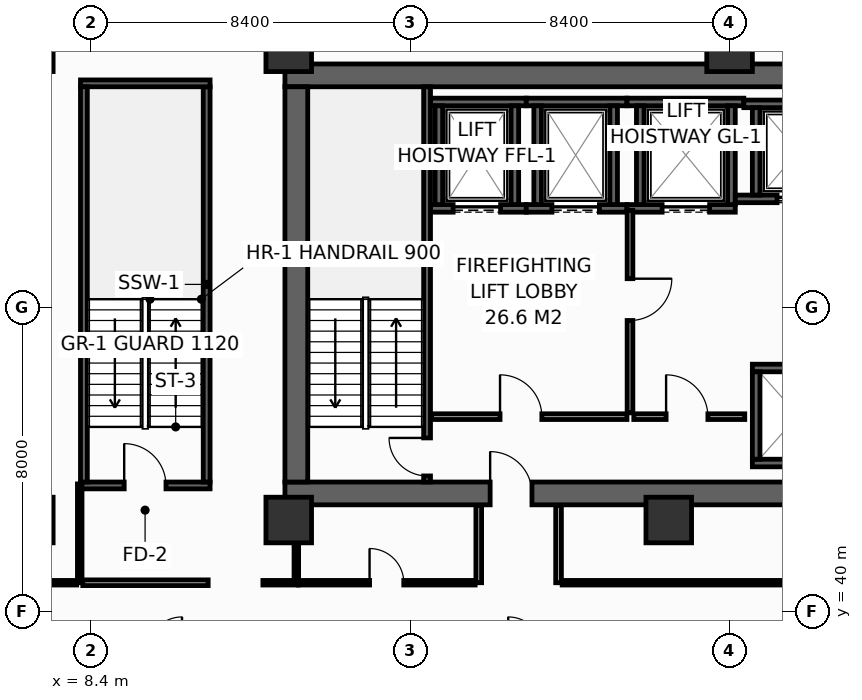
"""IFC4 building model, lengths in metres.
Left out: names, types, materials, properties, quantities, classifications, styles, units other than length and angle.
Written with IfcOpenShell. Run it as: python <this file> out.ifc"""

import sys

from ifc_helpers import new_model, si_unit, direction, frame, frame_2d, origin, origin_2d, place, context, subcontext, project, spatial, rectangle, hollow_rectangle, extrude, element, fill, save


model = new_model("IFC4")
c1 = context("Model", 3, precision=1e-05, world=origin(), true_north=direction((0.0, 1.0)))
c2 = subcontext(c1, "Body", "Model", "MODEL_VIEW")
j1 = project(units=[si_unit("LENGTHUNIT", "METRE"), si_unit("PLANEANGLEUNIT", "RADIAN")], contexts=[c1])
p1 = place(None, origin())
s1 = spatial("IfcSite", under=j1, at=p1, CompositionType="ELEMENT")
p2 = place(p1, origin())
s2 = spatial("IfcBuilding", under=s1, at=p2, CompositionType="ELEMENT")
p3 = place(p2, frame((0.0, 0.0, 38.4)))
s3 = spatial("IfcBuildingStorey", under=s2, at=p3, CompositionType="ELEMENT", Elevation=38.4)
p4 = place(p3, frame((13.5, 43.1, 0.0), z_axis=(0.0, 0.0, 1.0), x_axis=(1.0, 0.0, 0.0)))
e1 = element("IfcWall", 1, at=p4, inside=s3, PredefinedType="SHEAR", context=c2, shape_type="SweptSolid", body=[
    extrude(rectangle(XDim=32.9, YDim=0.6, at=frame_2d((16.45, 0.0))), origin(), (0.0, 0.0, 1.0), 4.15),
])
p5 = place(p4, frame((5.4, 0.0, 0.0)))
e2 = element("IfcOpeningElement", 2, at=p5, cuts=e1, PredefinedType="OPENING", context=c2, shape_type="SweptSolid", body=[
    extrude(rectangle(XDim=1.1, YDim=2.15, at=frame_2d((0.55, 1.075))), frame((0.0, 0.31, 0.0), z_axis=(0.0, -1.0, 0.0), x_axis=(1.0, 0.0, 0.0)), (0.0, 0.0, 1.0), 0.62),
])
p6 = place(p4, frame((25.6, 0.0, 0.0)))
e3 = element("IfcOpeningElement", 3, at=p6, cuts=e1, PredefinedType="OPENING", context=c2, shape_type="SweptSolid", body=[
    extrude(rectangle(XDim=1.1, YDim=2.15, at=frame_2d((0.55, 1.075))), frame((0.0, 0.31, 0.0), z_axis=(0.0, -1.0, 0.0), x_axis=(1.0, 0.0, 0.0)), (0.0, 0.0, 1.0), 0.62),
])
p7 = place(p3, frame((13.5, 54.1, 0.0), z_axis=(0.0, 0.0, 1.0), x_axis=(1.0, 0.0, 0.0)))
e4 = element("IfcWall", 4, at=p7, inside=s3, PredefinedType="SHEAR", context=c2, shape_type="SweptSolid", body=[
    extrude(rectangle(XDim=32.9, YDim=0.6, at=frame_2d((16.45, 0.0))), origin(), (0.0, 0.0, 1.0), 4.15),
])
p8 = place(p3, frame((13.8, 43.4, 0.0), z_axis=(0.0, 0.0, 1.0), x_axis=(0.0, 1.0, 0.0)))
e5 = element("IfcWall", 5, at=p8, inside=s3, PredefinedType="SHEAR", context=c2, shape_type="SweptSolid", body=[
    extrude(rectangle(XDim=10.4, YDim=0.6, at=frame_2d((5.2, 0.0))), origin(), (0.0, 0.0, 1.0), 4.15),
])
for number, where, z_axis, x_axis in (
    (6, (6.8, 54.8, 0.0), (0.0, 0.0, 1.0), (1.0, 0.0, 0.0)),
    (7, (13.6, 54.8, 0.0), (0.0, 0.0, 1.0), (1.0, 0.0, 0.0)),
    (8, (25.2, 54.8, 0.0), (0.0, 0.0, 1.0), (1.0, 0.0, 0.0)),
    (9, (6.8, 42.4, 0.0), (0.0, 0.0, 1.0), (1.0, 0.0, 0.0)),
    (10, (13.6, 42.4, 0.0), (0.0, 0.0, 1.0), (1.0, 0.0, 0.0)),
    (11, (23.6, 42.4, 0.0), (0.0, 0.0, 1.0), (1.0, 0.0, 0.0)),
):
    element("IfcColumn", number, at=place(p3, frame(where, z_axis=z_axis, x_axis=x_axis)), inside=s3, PredefinedType="COLUMN", context=c2, shape_type="SweptSolid", body=[
        extrude(hollow_rectangle(XDim=1.2, YDim=1.2, WallThickness=0.055, at=origin_2d()), origin(), (0.0, 0.0, 1.0), 4.4),
    ])
p9 = place(p3, frame((17.33, 50.6, 0.0), z_axis=(0.0, 0.0, 1.0), x_axis=(1.0, 0.0, 0.0)))
e12 = element("IfcWall", 12, at=p9, inside=s3, PredefinedType="SHEAR", context=c2, shape_type="SweptSolid", body=[
    extrude(rectangle(XDim=2.52, YDim=0.2, at=frame_2d((1.26, 0.0))), origin(), (0.0, 0.0, 1.0), 4.15),
])
p10 = place(p9, frame((0.595, 0.0, 0.0)))
e13 = element("IfcOpeningElement", 13, at=p10, cuts=e12, PredefinedType="OPENING", context=c2, shape_type="SweptSolid", body=[
    extrude(rectangle(XDim=1.25, YDim=2.3, at=frame_2d((0.625, 1.15))), frame((0.0, 0.11, 0.0), z_axis=(0.0, -1.0, 0.0), x_axis=(1.0, 0.0, 0.0)), (0.0, 0.0, 1.0), 0.22),
])
p11 = place(p3, frame((17.33, 53.4, 0.0), z_axis=(0.0, 0.0, 1.0), x_axis=(1.0, 0.0, 0.0)))
e14 = element("IfcWall", 14, at=p11, inside=s3, PredefinedType="SHEAR", context=c2, shape_type="SweptSolid", body=[
    extrude(rectangle(XDim=2.52, YDim=0.2, at=frame_2d((1.26, 0.0))), origin(), (0.0, 0.0, 1.0), 4.15),
])
for number, where, z_axis, x_axis in (
    (15, (17.55, 50.7, 0.0), (0.0, 0.0, 1.0), (0.0, 1.0, 0.0)),
    (16, (19.55, 50.7, 0.0), (0.0, 0.0, 1.0), (0.0, 1.0, 0.0)),
):
    element("IfcWall", number, at=place(p3, frame(where, z_axis=z_axis, x_axis=x_axis)), inside=s3, PredefinedType="SHEAR", context=c2, shape_type="SweptSolid", body=[
        extrude(rectangle(XDim=2.6, YDim=0.2, at=frame_2d((1.3, 0.0))), origin(), (0.0, 0.0, 1.0), 4.15),
    ])
p12 = place(p3, frame((19.85, 50.6, 0.0), z_axis=(0.0, 0.0, 1.0), x_axis=(1.0, 0.0, 0.0)))
e17 = element("IfcWall", 17, at=p12, inside=s3, PredefinedType="SHEAR", context=c2, shape_type="SweptSolid", body=[
    extrude(rectangle(XDim=2.65, YDim=0.2, at=frame_2d((1.325, 0.0))), origin(), (0.0, 0.0, 1.0), 4.15),
])
p13 = place(p12, frame((0.675, 0.0, 0.0)))
e18 = element("IfcOpeningElement", 18, at=p13, cuts=e17, PredefinedType="OPENING", context=c2, shape_type="SweptSolid", body=[
    extrude(rectangle(XDim=1.25, YDim=2.3, at=frame_2d((0.625, 1.15))), frame((0.0, 0.11, 0.0), z_axis=(0.0, -1.0, 0.0), x_axis=(1.0, 0.0, 0.0)), (0.0, 0.0, 1.0), 0.22),
])
p14 = place(p3, frame((19.85, 53.4, 0.0), z_axis=(0.0, 0.0, 1.0), x_axis=(1.0, 0.0, 0.0)))
e19 = element("IfcWall", 19, at=p14, inside=s3, PredefinedType="SHEAR", context=c2, shape_type="SweptSolid", body=[
    extrude(rectangle(XDim=2.65, YDim=0.2, at=frame_2d((1.325, 0.0))), origin(), (0.0, 0.0, 1.0), 4.15),
])
for number, where, z_axis, x_axis in (
    (20, (20.15, 50.7, 0.0), (0.0, 0.0, 1.0), (0.0, 1.0, 0.0)),
    (21, (22.15, 50.7, 0.0), (0.0, 0.0, 1.0), (0.0, 1.0, 0.0)),
):
    element("IfcWall", number, at=place(p3, frame(where, z_axis=z_axis, x_axis=x_axis)), inside=s3, PredefinedType="SHEAR", context=c2, shape_type="SweptSolid", body=[
        extrude(rectangle(XDim=2.6, YDim=0.2, at=frame_2d((1.3, 0.0))), origin(), (0.0, 0.0, 1.0), 4.15),
    ])
p15 = place(p3, frame((22.5, 50.6, 0.0), z_axis=(0.0, 0.0, 1.0), x_axis=(1.0, 0.0, 0.0)))
e22 = element("IfcWall", 22, at=p15, inside=s3, PredefinedType="SHEAR", context=c2, shape_type="SweptSolid", body=[
    extrude(rectangle(XDim=2.85, YDim=0.2, at=frame_2d((1.425, 0.0))), origin(), (0.0, 0.0, 1.0), 4.15),
])
p16 = place(p15, frame((0.925, 0.0, 0.0)))
e23 = element("IfcOpeningElement", 23, at=p16, cuts=e22, PredefinedType="OPENING", context=c2, shape_type="SweptSolid", body=[
    extrude(rectangle(XDim=1.25, YDim=2.3, at=frame_2d((0.625, 1.15))), frame((0.0, 0.11, 0.0), z_axis=(0.0, -1.0, 0.0), x_axis=(1.0, 0.0, 0.0)), (0.0, 0.0, 1.0), 0.22),
])
p17 = place(p3, frame((22.5, 53.4, 0.0), z_axis=(0.0, 0.0, 1.0), x_axis=(1.0, 0.0, 0.0)))
e24 = element("IfcWall", 24, at=p17, inside=s3, PredefinedType="SHEAR", context=c2, shape_type="SweptSolid", body=[
    extrude(rectangle(XDim=3.075, YDim=0.2, at=frame_2d((1.538, 0.0))), origin(), (0.0, 0.0, 1.0), 4.15),
])
for number, where, z_axis, x_axis in (
    (25, (22.85, 50.7, 0.0), (0.0, 0.0, 1.0), (0.0, 1.0, 0.0)),
    (26, (25.25, 50.7, 0.0), (0.0, 0.0, 1.0), (0.0, 1.0, 0.0)),
):
    element("IfcWall", number, at=place(p3, frame(where, z_axis=z_axis, x_axis=x_axis)), inside=s3, PredefinedType="SHEAR", context=c2, shape_type="SweptSolid", body=[
        extrude(rectangle(XDim=2.6, YDim=0.2, at=frame_2d((1.3, 0.0))), origin(), (0.0, 0.0, 1.0), 4.15),
    ])
p18 = place(p3, frame((25.35, 50.85, 0.0), z_axis=(0.0, 0.0, 1.0), x_axis=(1.0, 0.0, 0.0)))
e27 = element("IfcWall", 27, at=p18, inside=s3, PredefinedType="SHEAR", context=c2, shape_type="SweptSolid", body=[
    extrude(rectangle(XDim=3.025, YDim=0.2, at=frame_2d((1.512, 0.0))), origin(), (0.0, 0.0, 1.0), 4.15),
])
p19 = place(p18, frame((1.1, 0.0, 0.0)))
e28 = element("IfcOpeningElement", 28, at=p19, cuts=e27, PredefinedType="OPENING", context=c2, shape_type="SweptSolid", body=[
    extrude(rectangle(XDim=1.1, YDim=2.2, at=frame_2d((0.55, 1.1))), frame((0.0, 0.11, 0.0), z_axis=(0.0, -1.0, 0.0), x_axis=(1.0, 0.0, 0.0)), (0.0, 0.0, 1.0), 0.22),
])
p20 = place(p3, frame((25.575, 53.35, 0.0), z_axis=(0.0, 0.0, 1.0), x_axis=(1.0, 0.0, 0.0)))
e29 = element("IfcWall", 29, at=p20, inside=s3, PredefinedType="SHEAR", context=c2, shape_type="SweptSolid", body=[
    extrude(rectangle(XDim=2.8, YDim=0.2, at=frame_2d((1.4, 0.0))), origin(), (0.0, 0.0, 1.0), 4.15),
])
p21 = place(p3, frame((25.9, 50.95, 0.0), z_axis=(0.0, 0.0, 1.0), x_axis=(0.0, 1.0, 0.0)))
e30 = element("IfcWall", 30, at=p21, inside=s3, PredefinedType="SHEAR", context=c2, shape_type="SweptSolid", body=[
    extrude(rectangle(XDim=2.3, YDim=0.2, at=frame_2d((1.15, 0.0))), origin(), (0.0, 0.0, 1.0), 4.15),
])
for number, where, z_axis, x_axis in (
    (31, (25.8, 43.9, 0.0), (0.0, 0.0, 1.0), (1.0, 0.0, 0.0)),
    (32, (25.8, 46.4, 0.0), (0.0, 0.0, 1.0), (1.0, 0.0, 0.0)),
):
    element("IfcWall", number, at=place(p3, frame(where, z_axis=z_axis, x_axis=x_axis)), inside=s3, PredefinedType="SHEAR", context=c2, shape_type="SweptSolid", body=[
        extrude(rectangle(XDim=2.575, YDim=0.2, at=frame_2d((1.288, 0.0))), origin(), (0.0, 0.0, 1.0), 4.15),
    ])
p22 = place(p3, frame((25.9, 44.0, 0.0), z_axis=(0.0, 0.0, 1.0), x_axis=(0.0, 1.0, 0.0)))
e33 = element("IfcWall", 33, at=p22, inside=s3, PredefinedType="SHEAR", context=c2, shape_type="SweptSolid", body=[
    extrude(rectangle(XDim=2.3, YDim=0.2, at=frame_2d((1.15, 0.0))), origin(), (0.0, 0.0, 1.0), 4.15),
])
p23 = place(p3, frame((17.24, 43.4, 0.0), z_axis=(0.0, 0.0, 1.0), x_axis=(0.0, 1.0, 0.0)))
e34 = element("IfcWall", 34, at=p23, inside=s3, PredefinedType="SHEAR", context=c2, shape_type="SweptSolid", body=[
    extrude(rectangle(XDim=10.4, YDim=0.18, at=frame_2d((5.2, 0.0))), origin(), (0.0, 0.0, 1.0), 4.15),
])
p24 = place(p23, frame((0.16, 0.0, 0.0)))
e35 = element("IfcOpeningElement", 35, at=p24, cuts=e34, PredefinedType="OPENING", context=c2, shape_type="SweptSolid", body=[
    extrude(rectangle(XDim=1.0, YDim=2.15, at=frame_2d((0.5, 1.075))), frame((0.0, 0.1, 0.0), z_axis=(0.0, -1.0, 0.0), x_axis=(1.0, 0.0, 0.0)), (0.0, 0.0, 1.0), 0.2),
])
p25 = place(p3, frame((8.12, 43.31, 0.0), z_axis=(0.0, 0.0, 1.0), x_axis=(1.0, 0.0, 0.0)))
e36 = element("IfcWall", 36, at=p25, inside=s3, PredefinedType="SHEAR", context=c2, shape_type="SweptSolid", body=[
    extrude(rectangle(XDim=3.41, YDim=0.18, at=frame_2d((1.705, 0.0))), origin(), (0.0, 0.0, 1.0), 4.15),
])
p26 = place(p25, frame((1.15, 0.0, 0.0)))
e37 = element("IfcOpeningElement", 37, at=p26, cuts=e36, PredefinedType="OPENING", context=c2, shape_type="SweptSolid", body=[
    extrude(rectangle(XDim=1.1, YDim=2.15, at=frame_2d((0.55, 1.075))), frame((0.0, 0.1, 0.0), z_axis=(0.0, -1.0, 0.0), x_axis=(1.0, 0.0, 0.0)), (0.0, 0.0, 1.0), 0.2),
])
p27 = place(p3, frame((11.44, 43.4, 0.0), z_axis=(0.0, 0.0, 1.0), x_axis=(0.0, 1.0, 0.0)))
e38 = element("IfcWall", 38, at=p27, inside=s3, PredefinedType="SHEAR", context=c2, shape_type="SweptSolid", body=[
    extrude(rectangle(XDim=10.4, YDim=0.18, at=frame_2d((5.2, 0.0))), origin(), (0.0, 0.0, 1.0), 4.15),
])
p28 = place(p3, frame((11.53, 53.89, 0.0), z_axis=(0.0, 0.0, 1.0), x_axis=(-1.0, 0.0, 0.0)))
e39 = element("IfcWall", 39, at=p28, inside=s3, PredefinedType="SHEAR", context=c2, shape_type="SweptSolid", body=[
    extrude(rectangle(XDim=3.41, YDim=0.18, at=frame_2d((1.705, 0.0))), origin(), (0.0, 0.0, 1.0), 4.15),
])
p29 = place(p3, frame((8.21, 53.8, 0.0), z_axis=(0.0, 0.0, 1.0), x_axis=(0.0, -1.0, 0.0)))
e40 = element("IfcWall", 40, at=p29, inside=s3, PredefinedType="SHEAR", context=c2, shape_type="SweptSolid", body=[
    extrude(rectangle(XDim=10.4, YDim=0.18, at=frame_2d((5.2, 0.0))), origin(), (0.0, 0.0, 1.0), 4.15),
])
p30 = place(p3, frame((17.36, 45.12, 0.0), z_axis=(0.0, 0.0, 1.0), x_axis=(1.0, 0.0, 0.0)))
e41 = element("IfcWall", 41, at=p30, inside=s3, PredefinedType="PARTITIONING", context=c2, shape_type="SweptSolid", body=[
    extrude(rectangle(XDim=5.14, YDim=0.15, at=frame_2d((2.57, 0.0))), origin(), (0.0, 0.0, 1.0), 4.15),
])
p31 = place(p30, frame((1.8, 0.0, 0.0)))
e42 = element("IfcOpeningElement", 42, at=p31, cuts=e41, PredefinedType="OPENING", context=c2, shape_type="SweptSolid", body=[
    extrude(rectangle(XDim=1.1, YDim=2.15, at=frame_2d((0.55, 1.075))), frame((0.0, 0.085, 0.0), z_axis=(0.0, -1.0, 0.0), x_axis=(1.0, 0.0, 0.0)), (0.0, 0.0, 1.0), 0.17),
])
p32 = place(p3, frame((22.58, 50.55, 0.0), z_axis=(0.0, 0.0, 1.0), x_axis=(0.0, -1.0, 0.0)))
e43 = element("IfcWall", 43, at=p32, inside=s3, PredefinedType="PARTITIONING", context=c2, shape_type="SweptSolid", body=[
    extrude(rectangle(XDim=5.33, YDim=0.15, at=frame_2d((2.665, 0.0))), origin(), (0.0, 0.0, 1.0), 4.15),
])
p33 = place(p32, frame((1.8, 0.0, 0.0)))
e44 = element("IfcOpeningElement", 44, at=p33, cuts=e43, PredefinedType="OPENING", context=c2, shape_type="SweptSolid", body=[
    extrude(rectangle(XDim=1.1, YDim=2.15, at=frame_2d((0.55, 1.075))), frame((0.0, 0.085, 0.0), z_axis=(0.0, -1.0, 0.0), x_axis=(1.0, 0.0, 0.0)), (0.0, 0.0, 1.0), 0.17),
])
p34 = place(p3, frame((22.68, 45.12, 0.0), z_axis=(0.0, 0.0, 1.0), x_axis=(1.0, 0.0, 0.0)))
e45 = element("IfcWall", 45, at=p34, inside=s3, PredefinedType="PARTITIONING", context=c2, shape_type="SweptSolid", body=[
    extrude(rectangle(XDim=2.92, YDim=0.15, at=frame_2d((1.46, 0.0))), origin(), (0.0, 0.0, 1.0), 4.15),
])
p35 = place(p34, frame((0.85, 0.0, 0.0)))
e46 = element("IfcOpeningElement", 46, at=p35, cuts=e45, PredefinedType="OPENING", context=c2, shape_type="SweptSolid", body=[
    extrude(rectangle(XDim=1.1, YDim=2.15, at=frame_2d((0.55, 1.075))), frame((0.0, 0.085, 0.0), z_axis=(0.0, -1.0, 0.0), x_axis=(1.0, 0.0, 0.0)), (0.0, 0.0, 1.0), 0.17),
])
p36 = place(p3, frame((12.92, 40.75, 0.0), z_axis=(0.0, 0.0, 1.0), x_axis=(1.0, 0.0, 0.0)))
e47 = element("IfcWall", 47, at=p36, inside=s3, PredefinedType="PARTITIONING", context=c2, shape_type="SweptSolid", body=[
    extrude(rectangle(XDim=0.93, YDim=0.12, at=frame_2d((0.465, 0.0))), origin(), (0.0, 0.0, 1.0), 4.15),
])
p37 = place(p3, frame((13.8, 40.83, 0.0), z_axis=(0.0, 0.0, 1.0), x_axis=(0.0, 1.0, 0.0)))
e48 = element("IfcWall", 48, at=p37, inside=s3, PredefinedType="PARTITIONING", context=c2, shape_type="SweptSolid", body=[
    extrude(rectangle(XDim=1.95, YDim=0.12, at=frame_2d((0.975, 0.0))), origin(), (0.0, 0.0, 1.0), 4.15),
])
p38 = place(p3, frame((8.1, 40.75, 0.0), z_axis=(0.0, 0.0, 1.0), x_axis=(0.0, 1.0, 0.0)))
e49 = element("IfcWall", 49, at=p38, inside=s3, PredefinedType="PARTITIONING", context=c2, shape_type="SweptSolid", body=[
    extrude(rectangle(XDim=2.6, YDim=0.12, at=frame_2d((1.3, 0.0))), origin(), (0.0, 0.0, 1.0), 3.335),
])
p39 = place(p3, frame((8.18, 40.75, 0.0), z_axis=(0.0, 0.0, 1.0), x_axis=(1.0, 0.0, 0.0)))
e50 = element("IfcWall", 50, at=p39, inside=s3, PredefinedType="PARTITIONING", context=c2, shape_type="SweptSolid", body=[
    extrude(rectangle(XDim=3.3, YDim=0.15, at=frame_2d((1.65, 0.0))), origin(), (0.0, 0.0, 1.0), 4.15),
])
p40 = place(p3, frame((5.979, 40.75, 0.0), z_axis=(0.0, 0.0, 1.0), x_axis=(1.0, 0.0, 0.0)))
e51 = element("IfcWall", 51, at=p40, inside=s3, PredefinedType="PARTITIONING", context=c2, shape_type="SweptSolid", body=[
    extrude(rectangle(XDim=2.041, YDim=0.12, at=frame_2d((1.02, 0.0))), origin(), (0.0, 0.0, 1.0), 3.635),
])
for number, where, z_axis, x_axis in (
    (52, (18.6, 40.75, 0.0), (0.0, 0.0, 1.0), (0.0, 1.0, 0.0)),
    (53, (20.7, 40.75, 0.0), (0.0, 0.0, 1.0), (0.0, 1.0, 0.0)),
):
    element("IfcWall", number, at=place(p3, frame(where, z_axis=z_axis, x_axis=x_axis)), inside=s3, PredefinedType="PARTITIONING", context=c2, shape_type="SweptSolid", body=[
        extrude(rectangle(XDim=2.03, YDim=0.15, at=frame_2d((1.015, 0.0))), origin(), (0.0, 0.0, 1.0), 4.15),
    ])
p41 = place(p3, frame((13.85, 40.75, 0.0), z_axis=(0.0, 0.0, 1.0), x_axis=(1.0, 0.0, 0.0)))
e54 = element("IfcWall", 54, at=p41, inside=s3, PredefinedType="PARTITIONING", context=c2, shape_type="SweptSolid", body=[
    extrude(rectangle(XDim=4.655, YDim=0.12, at=frame_2d((2.327, 0.0))), origin(), (0.0, 0.0, 1.0), 4.15),
])
p42 = place(p41, frame((1.877, 0.0, 0.0)))
e55 = element("IfcOpeningElement", 55, at=p42, cuts=e54, PredefinedType="OPENING", context=c2, shape_type="SweptSolid", body=[
    extrude(rectangle(XDim=0.9, YDim=2.1, at=frame_2d((0.45, 1.05))), frame((0.0, 0.07, 0.0), z_axis=(0.0, -1.0, 0.0), x_axis=(1.0, 0.0, 0.0)), (0.0, 0.0, 1.0), 0.14),
])
p43 = place(p3, frame((20.795, 40.75, 0.0), z_axis=(0.0, 0.0, 1.0), x_axis=(1.0, 0.0, 0.0)))
e56 = element("IfcWall", 56, at=p43, inside=s3, PredefinedType="PARTITIONING", context=c2, shape_type="SweptSolid", body=[
    extrude(rectangle(XDim=17.91, YDim=0.12, at=frame_2d((8.955, 0.0))), origin(), (0.0, 0.0, 1.0), 3.335),
])
p44 = place(p43, frame((8.505, 0.0, 0.0)))
e57 = element("IfcOpeningElement", 57, at=p44, cuts=e56, PredefinedType="OPENING", context=c2, shape_type="SweptSolid", body=[
    extrude(rectangle(XDim=0.9, YDim=2.1, at=frame_2d((0.45, 1.05))), frame((0.0, 0.07, 0.0), z_axis=(0.0, -1.0, 0.0), x_axis=(1.0, 0.0, 0.0)), (0.0, 0.0, 1.0), 0.14),
])
p45 = place(p10, origin())
e58 = element("IfcDoor", 58, at=p45, inside=s3, OperationType="SLIDING_TO_LEFT", PredefinedType="DOOR", context=c2, shape_type="SweptSolid", body=[
    extrude(rectangle(XDim=1.25, YDim=2.3, at=frame_2d((0.625, 1.15))), frame((0.0, 0.025, 0.0), z_axis=(0.0, -1.0, 0.0), x_axis=(1.0, 0.0, 0.0)), (0.0, 0.0, 1.0), 0.05),
])
fill(e13, e58)
p46 = place(p13, origin())
e59 = element("IfcDoor", 59, at=p46, inside=s3, OperationType="SLIDING_TO_LEFT", PredefinedType="DOOR", context=c2, shape_type="SweptSolid", body=[
    extrude(rectangle(XDim=1.25, YDim=2.3, at=frame_2d((0.625, 1.15))), frame((0.0, 0.025, 0.0), z_axis=(0.0, -1.0, 0.0), x_axis=(1.0, 0.0, 0.0)), (0.0, 0.0, 1.0), 0.05),
])
fill(e18, e59)
p47 = place(p16, origin())
e60 = element("IfcDoor", 60, at=p47, inside=s3, OperationType="SLIDING_TO_LEFT", PredefinedType="DOOR", context=c2, shape_type="SweptSolid", body=[
    extrude(rectangle(XDim=1.25, YDim=2.3, at=frame_2d((0.625, 1.15))), frame((0.0, 0.025, 0.0), z_axis=(0.0, -1.0, 0.0), x_axis=(1.0, 0.0, 0.0)), (0.0, 0.0, 1.0), 0.05),
])
fill(e23, e60)
p48 = place(p19, origin())
e61 = element("IfcDoor", 61, at=p48, inside=s3, OperationType="SLIDING_TO_LEFT", PredefinedType="DOOR", context=c2, shape_type="SweptSolid", body=[
    extrude(rectangle(XDim=1.1, YDim=2.2, at=frame_2d((0.55, 1.1))), frame((0.0, 0.025, 0.0), z_axis=(0.0, -1.0, 0.0), x_axis=(1.0, 0.0, 0.0)), (0.0, 0.0, 1.0), 0.05),
])
fill(e28, e61)
p49 = place(p24, origin())
e62 = element("IfcDoor", 62, at=p49, inside=s3, OperationType="SINGLE_SWING_RIGHT", PredefinedType="DOOR", context=c2, shape_type="SweptSolid", body=[
    extrude(rectangle(XDim=1.0, YDim=2.15, at=frame_2d((0.5, 1.075))), frame((0.0, 0.025, 0.0), z_axis=(0.0, -1.0, 0.0), x_axis=(1.0, 0.0, 0.0)), (0.0, 0.0, 1.0), 0.05),
])
fill(e35, e62)
p50 = place(p26, origin())
e63 = element("IfcDoor", 63, at=p50, inside=s3, OperationType="SINGLE_SWING_LEFT", PredefinedType="DOOR", context=c2, shape_type="SweptSolid", body=[
    extrude(rectangle(XDim=1.1, YDim=2.15, at=frame_2d((0.55, 1.075))), frame((0.0, 0.025, 0.0), z_axis=(0.0, -1.0, 0.0), x_axis=(1.0, 0.0, 0.0)), (0.0, 0.0, 1.0), 0.05),
])
fill(e37, e63)
p51 = place(p31, origin())
e64 = element("IfcDoor", 64, at=p51, inside=s3, OperationType="SINGLE_SWING_LEFT", PredefinedType="DOOR", context=c2, shape_type="SweptSolid", body=[
    extrude(rectangle(XDim=1.1, YDim=2.15, at=frame_2d((0.55, 1.075))), frame((0.0, 0.025, 0.0), z_axis=(0.0, -1.0, 0.0), x_axis=(1.0, 0.0, 0.0)), (0.0, 0.0, 1.0), 0.05),
])
fill(e42, e64)
p52 = place(p33, origin())
e65 = element("IfcDoor", 65, at=p52, inside=s3, OperationType="SINGLE_SWING_LEFT", PredefinedType="DOOR", context=c2, shape_type="SweptSolid", body=[
    extrude(rectangle(XDim=1.1, YDim=2.15, at=frame_2d((0.55, 1.075))), frame((0.0, 0.025, 0.0), z_axis=(0.0, -1.0, 0.0), x_axis=(1.0, 0.0, 0.0)), (0.0, 0.0, 1.0), 0.05),
])
fill(e44, e65)
p53 = place(p35, origin())
e66 = element("IfcDoor", 66, at=p53, inside=s3, OperationType="SINGLE_SWING_LEFT", PredefinedType="DOOR", context=c2, shape_type="SweptSolid", body=[
    extrude(rectangle(XDim=1.1, YDim=2.15, at=frame_2d((0.55, 1.075))), frame((0.0, 0.025, 0.0), z_axis=(0.0, -1.0, 0.0), x_axis=(1.0, 0.0, 0.0)), (0.0, 0.0, 1.0), 0.05),
])
fill(e46, e66)
p54 = place(p5, origin())
e67 = element("IfcDoor", 67, at=p54, inside=s3, OperationType="SINGLE_SWING_LEFT", PredefinedType="DOOR", context=c2, shape_type="SweptSolid", body=[
    extrude(rectangle(XDim=1.1, YDim=2.15, at=frame_2d((0.55, 1.075))), frame((0.0, 0.025, 0.0), z_axis=(0.0, -1.0, 0.0), x_axis=(1.0, 0.0, 0.0)), (0.0, 0.0, 1.0), 0.05),
])
fill(e2, e67)
p55 = place(p42, origin())
e68 = element("IfcDoor", 68, at=p55, inside=s3, OperationType="SINGLE_SWING_LEFT", PredefinedType="DOOR", context=c2, shape_type="SweptSolid", body=[
    extrude(rectangle(XDim=0.9, YDim=2.1, at=frame_2d((0.45, 1.05))), frame((0.0, 0.025, 0.0), z_axis=(0.0, -1.0, 0.0), x_axis=(1.0, 0.0, 0.0)), (0.0, 0.0, 1.0), 0.05),
])
fill(e55, e68)
save(model, sys.argv[1])
